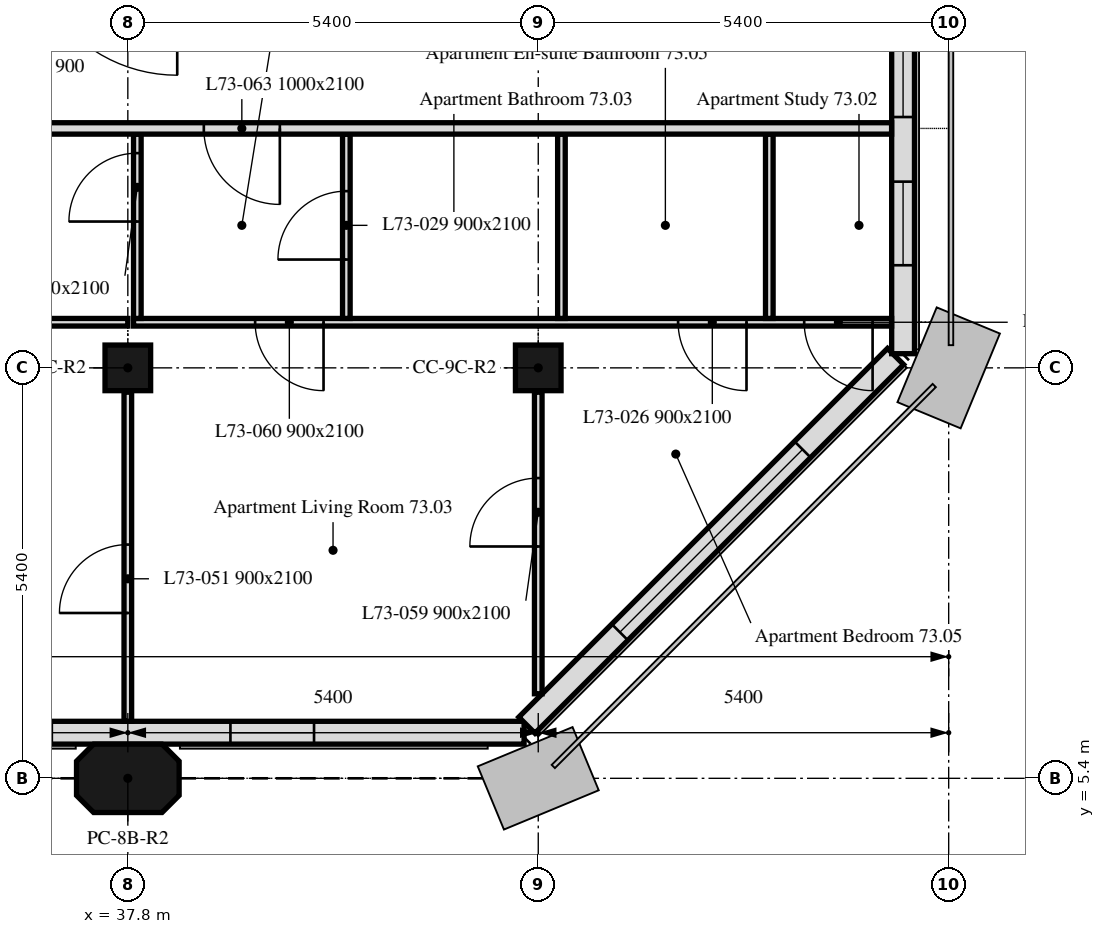
"""IFC4 building model, lengths in metres.
Left out: names, types, materials, properties, quantities, classifications, styles, units other than length and angle.
Written with IfcOpenShell. Run it as: python <this file> out.ifc"""

import sys

from ifc_helpers import new_model, si_unit, direction, frame, frame_2d, origin, origin_2d, place, context, subcontext, project, spatial, polyline, rectangle, outline, extrude, element, fill, save


model = new_model("IFC4")
c1 = context("Model", 3, precision=1e-05, world=origin(), true_north=direction((0.0, 1.0)))
c2 = subcontext(c1, "Body", "Model", "MODEL_VIEW")
j1 = project(units=[si_unit("LENGTHUNIT", "METRE"), si_unit("PLANEANGLEUNIT", "RADIAN")], contexts=[c1])
p1 = place(None, origin())
s1 = spatial("IfcSite", under=j1, at=p1, CompositionType="ELEMENT")
p2 = place(p1, origin())
s2 = spatial("IfcBuilding", under=s1, at=p2, CompositionType="ELEMENT")
p3 = place(p2, frame((0.0, 0.0, 295.0)))
s3 = spatial("IfcBuildingStorey", under=s2, at=p3, CompositionType="ELEMENT", Elevation=295.0)
p4 = place(p3, frame((37.8, 5.4, 0.0), z_axis=(0.0, 0.0, 1.0), x_axis=(1.0, 0.0, 0.0)))
e1 = element("IfcColumn", 1, at=p4, inside=s3, PredefinedType="COLUMN", context=c2, shape_type="SweptSolid", body=[
    extrude(outline(polyline([(-0.45, -0.45), (0.45, -0.45), (0.675, -0.225), (0.675, 0.225), (0.45, 0.45), (-0.45, 0.45), (-0.675, 0.225), (-0.675, -0.225), (-0.45, -0.45)])), origin(), (0.0, 0.0, 1.0), 3.0),
])
for number, where, z_axis, x_axis in (
    (2, (37.8, 10.8, 0.0), (0.0, 0.0, 1.0), (1.0, 0.0, 0.0)),
    (3, (43.2, 10.8, 0.0), (0.0, 0.0, 1.0), (1.0, 0.0, 0.0)),
):
    element("IfcColumn", number, at=place(p3, frame(where, z_axis=z_axis, x_axis=x_axis)), inside=s3, PredefinedType="COLUMN", context=c2, shape_type="SweptSolid", body=[
        extrude(rectangle(XDim=0.6, YDim=0.6, at=origin_2d()), origin(), (0.0, 0.0, 1.0), 3.0),
    ])
p5 = place(p3, frame((10.986, 6.0, 0.0), z_axis=(0.0, 0.0, 1.0), x_axis=(1.0, 0.0, 0.0)))
e4 = element("IfcWall", 4, at=p5, inside=s3, PredefinedType="SOLIDWALL", context=c2, shape_type="SweptSolid", body=[
    extrude(rectangle(XDim=32.027, YDim=0.3, at=frame_2d((16.014, 0.0))), origin(), (0.0, 0.0, 1.0), 3.0),
])
p6 = place(p5, frame((0.814, 0.0, 0.9)))
e5 = element("IfcOpeningElement", 5, at=p6, cuts=e4, PredefinedType="OPENING", context=c2, shape_type="SweptSolid", body=[
    extrude(rectangle(XDim=3.4, YDim=1.7, at=frame_2d((1.7, 0.85))), frame((0.0, 0.16, 0.0), z_axis=(0.0, -1.0, 0.0), x_axis=(1.0, 0.0, 0.0)), (0.0, 0.0, 1.0), 0.32),
])
p7 = place(p5, frame((6.564, 0.0, 0.9)))
e6 = element("IfcOpeningElement", 6, at=p7, cuts=e4, PredefinedType="OPENING", context=c2, shape_type="SweptSolid", body=[
    extrude(rectangle(XDim=1.1, YDim=1.7, at=frame_2d((0.55, 0.85))), frame((0.0, 0.16, 0.0), z_axis=(0.0, -1.0, 0.0), x_axis=(1.0, 0.0, 0.0)), (0.0, 0.0, 1.0), 0.32),
])
p8 = place(p5, frame((11.614, 0.0, 0.9)))
e7 = element("IfcOpeningElement", 7, at=p8, cuts=e4, PredefinedType="OPENING", context=c2, shape_type="SweptSolid", body=[
    extrude(rectangle(XDim=3.4, YDim=1.7, at=frame_2d((1.7, 0.85))), frame((0.0, 0.16, 0.0), z_axis=(0.0, -1.0, 0.0), x_axis=(1.0, 0.0, 0.0)), (0.0, 0.0, 1.0), 0.32),
])
p9 = place(p5, frame((17.364, 0.0, 0.9)))
e8 = element("IfcOpeningElement", 8, at=p9, cuts=e4, PredefinedType="OPENING", context=c2, shape_type="SweptSolid", body=[
    extrude(rectangle(XDim=1.1, YDim=1.7, at=frame_2d((0.55, 0.85))), frame((0.0, 0.16, 0.0), z_axis=(0.0, -1.0, 0.0), x_axis=(1.0, 0.0, 0.0)), (0.0, 0.0, 1.0), 0.32),
])
p10 = place(p5, frame((22.414, 0.0, 0.9)))
e9 = element("IfcOpeningElement", 9, at=p10, cuts=e4, PredefinedType="OPENING", context=c2, shape_type="SweptSolid", body=[
    extrude(rectangle(XDim=3.4, YDim=1.7, at=frame_2d((1.7, 0.85))), frame((0.0, 0.16, 0.0), z_axis=(0.0, -1.0, 0.0), x_axis=(1.0, 0.0, 0.0)), (0.0, 0.0, 1.0), 0.32),
])
p11 = place(p5, frame((28.164, 0.0, 0.9)))
e10 = element("IfcOpeningElement", 10, at=p11, cuts=e4, PredefinedType="OPENING", context=c2, shape_type="SweptSolid", body=[
    extrude(rectangle(XDim=1.1, YDim=1.7, at=frame_2d((0.55, 0.85))), frame((0.0, 0.16, 0.0), z_axis=(0.0, -1.0, 0.0), x_axis=(1.0, 0.0, 0.0)), (0.0, 0.0, 1.0), 0.32),
])
p12 = place(p3, frame((43.051, 6.099, 0.0), z_axis=(0.0, 0.0, 1.0), x_axis=(0.707106781187, 0.707106781187, 0.0)))
e11 = element("IfcWall", 11, at=p12, inside=s3, PredefinedType="SOLIDWALL", context=c2, shape_type="SweptSolid", body=[
    extrude(rectangle(XDim=6.86, YDim=0.3, at=frame_2d((3.43, 0.0))), origin(), (0.0, 0.0, 1.0), 3.0),
])
p13 = place(p12, frame((1.73, 0.0, 0.9)))
e12 = element("IfcOpeningElement", 12, at=p13, cuts=e11, PredefinedType="OPENING", context=c2, shape_type="SweptSolid", body=[
    extrude(rectangle(XDim=3.4, YDim=1.7, at=frame_2d((1.7, 0.85))), frame((0.0, 0.16, 0.0), z_axis=(0.0, -1.0, 0.0), x_axis=(1.0, 0.0, 0.0)), (0.0, 0.0, 1.0), 0.32),
])
p14 = place(p3, frame((48.0, 10.986, 0.0), z_axis=(0.0, 0.0, 1.0), x_axis=(0.0, 1.0, 0.0)))
e13 = element("IfcWall", 13, at=p14, inside=s3, PredefinedType="SOLIDWALL", context=c2, shape_type="SweptSolid", body=[
    extrude(rectangle(XDim=32.027, YDim=0.3, at=frame_2d((16.014, 0.0))), origin(), (0.0, 0.0, 1.0), 3.0),
])
p15 = place(p14, frame((1.164, 0.0, 0.9)))
e14 = element("IfcOpeningElement", 14, at=p15, cuts=e13, PredefinedType="OPENING", context=c2, shape_type="SweptSolid", body=[
    extrude(rectangle(XDim=1.1, YDim=1.7, at=frame_2d((0.55, 0.85))), frame((0.0, 0.16, 0.0), z_axis=(0.0, -1.0, 0.0), x_axis=(1.0, 0.0, 0.0)), (0.0, 0.0, 1.0), 0.32),
])
p16 = place(p14, frame((3.114, 0.0, 0.9)))
e15 = element("IfcOpeningElement", 15, at=p16, cuts=e13, PredefinedType="OPENING", context=c2, shape_type="SweptSolid", body=[
    extrude(rectangle(XDim=1.1, YDim=1.7, at=frame_2d((0.55, 0.85))), frame((0.0, 0.16, 0.0), z_axis=(0.0, -1.0, 0.0), x_axis=(1.0, 0.0, 0.0)), (0.0, 0.0, 1.0), 0.32),
])
p17 = place(p14, frame((6.564, 0.0, 0.9)))
e16 = element("IfcOpeningElement", 16, at=p17, cuts=e13, PredefinedType="OPENING", context=c2, shape_type="SweptSolid", body=[
    extrude(rectangle(XDim=1.1, YDim=1.7, at=frame_2d((0.55, 0.85))), frame((0.0, 0.16, 0.0), z_axis=(0.0, -1.0, 0.0), x_axis=(1.0, 0.0, 0.0)), (0.0, 0.0, 1.0), 0.32),
])
p18 = place(p14, frame((8.164, 0.0, 0.9)))
e17 = element("IfcOpeningElement", 17, at=p18, cuts=e13, PredefinedType="OPENING", context=c2, shape_type="SweptSolid", body=[
    extrude(rectangle(XDim=1.1, YDim=1.7, at=frame_2d((0.55, 0.85))), frame((0.0, 0.16, 0.0), z_axis=(0.0, -1.0, 0.0), x_axis=(1.0, 0.0, 0.0)), (0.0, 0.0, 1.0), 0.32),
])
p19 = place(p14, frame((11.614, 0.0, 0.9)))
e18 = element("IfcOpeningElement", 18, at=p19, cuts=e13, PredefinedType="OPENING", context=c2, shape_type="SweptSolid", body=[
    extrude(rectangle(XDim=3.4, YDim=1.7, at=frame_2d((1.7, 0.85))), frame((0.0, 0.16, 0.0), z_axis=(0.0, -1.0, 0.0), x_axis=(1.0, 0.0, 0.0)), (0.0, 0.0, 1.0), 0.32),
])
p20 = place(p14, frame((17.364, 0.0, 0.9)))
e19 = element("IfcOpeningElement", 19, at=p20, cuts=e13, PredefinedType="OPENING", context=c2, shape_type="SweptSolid", body=[
    extrude(rectangle(XDim=1.1, YDim=1.7, at=frame_2d((0.55, 0.85))), frame((0.0, 0.16, 0.0), z_axis=(0.0, -1.0, 0.0), x_axis=(1.0, 0.0, 0.0)), (0.0, 0.0, 1.0), 0.32),
])
p21 = place(p14, frame((18.964, 0.0, 0.9)))
e20 = element("IfcOpeningElement", 20, at=p21, cuts=e13, PredefinedType="OPENING", context=c2, shape_type="SweptSolid", body=[
    extrude(rectangle(XDim=1.1, YDim=1.7, at=frame_2d((0.55, 0.85))), frame((0.0, 0.16, 0.0), z_axis=(0.0, -1.0, 0.0), x_axis=(1.0, 0.0, 0.0)), (0.0, 0.0, 1.0), 0.32),
])
p22 = place(p14, frame((22.839, 0.0, 0.9)))
e21 = element("IfcOpeningElement", 21, at=p22, cuts=e13, PredefinedType="OPENING", context=c2, shape_type="SweptSolid", body=[
    extrude(rectangle(XDim=0.65, YDim=1.7, at=frame_2d((0.325, 0.85))), frame((0.0, 0.16, 0.0), z_axis=(0.0, -1.0, 0.0), x_axis=(1.0, 0.0, 0.0)), (0.0, 0.0, 1.0), 0.32),
])
p23 = place(p14, frame((24.364, 0.0, 0.9)))
e22 = element("IfcOpeningElement", 22, at=p23, cuts=e13, PredefinedType="OPENING", context=c2, shape_type="SweptSolid", body=[
    extrude(rectangle(XDim=1.1, YDim=1.7, at=frame_2d((0.55, 0.85))), frame((0.0, 0.16, 0.0), z_axis=(0.0, -1.0, 0.0), x_axis=(1.0, 0.0, 0.0)), (0.0, 0.0, 1.0), 0.32),
])
p24 = place(p14, frame((28.164, 0.0, 0.9)))
e23 = element("IfcOpeningElement", 23, at=p24, cuts=e13, PredefinedType="OPENING", context=c2, shape_type="SweptSolid", body=[
    extrude(rectangle(XDim=1.1, YDim=1.7, at=frame_2d((0.55, 0.85))), frame((0.0, 0.16, 0.0), z_axis=(0.0, -1.0, 0.0), x_axis=(1.0, 0.0, 0.0)), (0.0, 0.0, 1.0), 0.32),
])
p25 = place(p14, frame((29.589, 0.0, 0.9)))
e24 = element("IfcOpeningElement", 24, at=p25, cuts=e13, PredefinedType="OPENING", context=c2, shape_type="SweptSolid", body=[
    extrude(rectangle(XDim=0.65, YDim=1.7, at=frame_2d((0.325, 0.85))), frame((0.0, 0.16, 0.0), z_axis=(0.0, -1.0, 0.0), x_axis=(1.0, 0.0, 0.0)), (0.0, 0.0, 1.0), 0.32),
])
p26 = place(p3, frame((37.8, 11.4, 0.0), z_axis=(0.0, 0.0, 1.0), x_axis=(-1.0, 0.0, 0.0)))
e25 = element("IfcWall", 25, at=p26, inside=s3, PredefinedType="PARTITIONING", context=c2, shape_type="SweptSolid", body=[
    extrude(rectangle(XDim=21.6, YDim=0.1, at=frame_2d((10.8, 0.0))), origin(), (0.0, 0.0, 1.0), 3.0),
])
p27 = place(p26, frame((18.87, 0.0, 0.0)))
e26 = element("IfcOpeningElement", 26, at=p27, cuts=e25, PredefinedType="OPENING", context=c2, shape_type="SweptSolid", body=[
    extrude(rectangle(XDim=0.9, YDim=2.1, at=frame_2d((0.45, 1.05))), frame((0.0, 0.05, 0.0), z_axis=(0.0, -1.0, 0.0), x_axis=(1.0, 0.0, 0.0)), (0.0, 0.0, 1.0), 0.1),
])
p28 = place(p26, frame((17.5, 0.0, 0.0)))
e27 = element("IfcOpeningElement", 27, at=p28, cuts=e25, PredefinedType="OPENING", context=c2, shape_type="SweptSolid", body=[
    extrude(rectangle(XDim=0.9, YDim=2.1, at=frame_2d((0.45, 1.05))), frame((0.0, 0.05, 0.0), z_axis=(0.0, -1.0, 0.0), x_axis=(1.0, 0.0, 0.0)), (0.0, 0.0, 1.0), 0.1),
])
p29 = place(p26, frame((6.917, 0.0, 0.0)))
e28 = element("IfcOpeningElement", 28, at=p29, cuts=e25, PredefinedType="OPENING", context=c2, shape_type="SweptSolid", body=[
    extrude(rectangle(XDim=0.9, YDim=2.1, at=frame_2d((0.45, 1.05))), frame((0.0, 0.05, 0.0), z_axis=(0.0, -1.0, 0.0), x_axis=(1.0, 0.0, 0.0)), (0.0, 0.0, 1.0), 0.1),
])
p30 = place(p26, frame((3.15, 0.0, 0.0)))
e29 = element("IfcOpeningElement", 29, at=p30, cuts=e25, PredefinedType="OPENING", context=c2, shape_type="SweptSolid", body=[
    extrude(rectangle(XDim=0.9, YDim=2.1, at=frame_2d((0.45, 1.05))), frame((0.0, 0.05, 0.0), z_axis=(0.0, -1.0, 0.0), x_axis=(1.0, 0.0, 0.0)), (0.0, 0.0, 1.0), 0.1),
])
p31 = place(p26, frame((14.158, 0.0, 0.0)))
e30 = element("IfcOpeningElement", 30, at=p31, cuts=e25, PredefinedType="OPENING", context=c2, shape_type="SweptSolid", body=[
    extrude(rectangle(XDim=0.9, YDim=2.1, at=frame_2d((0.45, 1.05))), frame((0.0, 0.05, 0.0), z_axis=(0.0, -1.0, 0.0), x_axis=(1.0, 0.0, 0.0)), (0.0, 0.0, 1.0), 0.1),
])
p32 = place(p26, frame((12.788, 0.0, 0.0)))
e31 = element("IfcOpeningElement", 31, at=p32, cuts=e25, PredefinedType="OPENING", context=c2, shape_type="SweptSolid", body=[
    extrude(rectangle(XDim=0.9, YDim=2.1, at=frame_2d((0.45, 1.05))), frame((0.0, 0.05, 0.0), z_axis=(0.0, -1.0, 0.0), x_axis=(1.0, 0.0, 0.0)), (0.0, 0.0, 1.0), 0.1),
])
p33 = place(p3, frame((37.8, 6.151, 0.0), z_axis=(0.0, 0.0, 1.0), x_axis=(0.0, 1.0, 0.0)))
e32 = element("IfcWall", 32, at=p33, inside=s3, PredefinedType="PARTITIONING", context=c2, shape_type="SweptSolid", body=[
    extrude(rectangle(XDim=4.329, YDim=0.1, at=frame_2d((2.165, 0.0))), origin(), (0.0, 0.0, 1.0), 3.0),
])
p34 = place(p33, frame((1.424, 0.0, 0.0)))
e33 = element("IfcOpeningElement", 33, at=p34, cuts=e32, PredefinedType="OPENING", context=c2, shape_type="SweptSolid", body=[
    extrude(rectangle(XDim=0.9, YDim=2.1, at=frame_2d((0.45, 1.05))), frame((0.0, 0.05, 0.0), z_axis=(0.0, -1.0, 0.0), x_axis=(1.0, 0.0, 0.0)), (0.0, 0.0, 1.0), 0.1),
])
p35 = place(p3, frame((43.2, 6.512, 0.0), z_axis=(0.0, 0.0, 1.0), x_axis=(0.0, 1.0, 0.0)))
e34 = element("IfcWall", 34, at=p35, inside=s3, PredefinedType="PARTITIONING", context=c2, shape_type="SweptSolid", body=[
    extrude(rectangle(XDim=3.968, YDim=0.1, at=frame_2d((1.984, 0.0))), origin(), (0.0, 0.0, 1.0), 3.0),
])
p36 = place(p35, frame((1.938, 0.0, 0.0)))
e35 = element("IfcOpeningElement", 35, at=p36, cuts=e34, PredefinedType="OPENING", context=c2, shape_type="SweptSolid", body=[
    extrude(rectangle(XDim=0.9, YDim=2.1, at=frame_2d((0.45, 1.05))), frame((0.0, 0.05, 0.0), z_axis=(0.0, -1.0, 0.0), x_axis=(1.0, 0.0, 0.0)), (0.0, 0.0, 1.0), 0.1),
])
p37 = place(p3, frame((47.849, 11.4, 0.0), z_axis=(0.0, 0.0, 1.0), x_axis=(-1.0, 0.0, 0.0)))
e36 = element("IfcWall", 36, at=p37, inside=s3, PredefinedType="PARTITIONING", context=c2, shape_type="SweptSolid", body=[
    extrude(rectangle(XDim=9.974, YDim=0.1, at=frame_2d((4.987, 0.0))), origin(), (0.0, 0.0, 1.0), 3.0),
])
p38 = place(p37, frame((1.909, 0.0, 0.0)))
e37 = element("IfcOpeningElement", 37, at=p38, cuts=e36, PredefinedType="OPENING", context=c2, shape_type="SweptSolid", body=[
    extrude(rectangle(XDim=0.9, YDim=2.1, at=frame_2d((0.45, 1.05))), frame((0.0, 0.05, 0.0), z_axis=(0.0, -1.0, 0.0), x_axis=(1.0, 0.0, 0.0)), (0.0, 0.0, 1.0), 0.1),
])
p39 = place(p37, frame((0.25, 0.0, 0.0)))
e38 = element("IfcOpeningElement", 38, at=p39, cuts=e36, PredefinedType="OPENING", context=c2, shape_type="SweptSolid", body=[
    extrude(rectangle(XDim=0.9, YDim=2.1, at=frame_2d((0.45, 1.05))), frame((0.0, 0.05, 0.0), z_axis=(0.0, -1.0, 0.0), x_axis=(1.0, 0.0, 0.0)), (0.0, 0.0, 1.0), 0.1),
])
p40 = place(p37, frame((7.474, 0.0, 0.0)))
e39 = element("IfcOpeningElement", 39, at=p40, cuts=e36, PredefinedType="OPENING", context=c2, shape_type="SweptSolid", body=[
    extrude(rectangle(XDim=0.9, YDim=2.1, at=frame_2d((0.45, 1.05))), frame((0.0, 0.05, 0.0), z_axis=(0.0, -1.0, 0.0), x_axis=(1.0, 0.0, 0.0)), (0.0, 0.0, 1.0), 0.1),
])
p41 = place(p3, frame((37.925, 11.45, 0.0), z_axis=(0.0, 0.0, 1.0), x_axis=(0.0, 1.0, 0.0)))
e40 = element("IfcWall", 40, at=p41, inside=s3, PredefinedType="PARTITIONING", context=c2, shape_type="SweptSolid", body=[
    extrude(rectangle(XDim=2.425, YDim=0.1, at=frame_2d((1.212, 0.0))), origin(), (0.0, 0.0, 1.0), 3.0),
])
p42 = place(p41, frame((1.275, 0.0, 0.0)))
e41 = element("IfcOpeningElement", 41, at=p42, cuts=e40, PredefinedType="OPENING", context=c2, shape_type="SweptSolid", body=[
    extrude(rectangle(XDim=0.9, YDim=2.1, at=frame_2d((0.45, 1.05))), frame((0.0, 0.05, 0.0), z_axis=(0.0, -1.0, 0.0), x_axis=(1.0, 0.0, 0.0)), (0.0, 0.0, 1.0), 0.1),
])
p43 = place(p3, frame((40.675, 11.45, 0.0), z_axis=(0.0, 0.0, 1.0), x_axis=(0.0, 1.0, 0.0)))
e42 = element("IfcWall", 42, at=p43, inside=s3, PredefinedType="PARTITIONING", context=c2, shape_type="SweptSolid", body=[
    extrude(rectangle(XDim=2.425, YDim=0.1, at=frame_2d((1.212, 0.0))), origin(), (0.0, 0.0, 1.0), 3.0),
])
p44 = place(p43, frame((0.775, 0.0, 0.0)))
e43 = element("IfcOpeningElement", 43, at=p44, cuts=e42, PredefinedType="OPENING", context=c2, shape_type="SweptSolid", body=[
    extrude(rectangle(XDim=0.9, YDim=2.1, at=frame_2d((0.45, 1.05))), frame((0.0, 0.05, 0.0), z_axis=(0.0, -1.0, 0.0), x_axis=(1.0, 0.0, 0.0)), (0.0, 0.0, 1.0), 0.1),
])
for number, where, z_axis, x_axis in (
    (44, (43.505, 11.45, 0.0), (0.0, 0.0, 1.0), (0.0, 1.0, 0.0)),
    (45, (46.24, 11.45, 0.0), (0.0, 0.0, 1.0), (0.0, 1.0, 0.0)),
):
    element("IfcWall", number, at=place(p3, frame(where, z_axis=z_axis, x_axis=x_axis)), inside=s3, PredefinedType="PARTITIONING", context=c2, shape_type="SweptSolid", body=[
        extrude(rectangle(XDim=2.425, YDim=0.1, at=frame_2d((1.212, 0.0))), origin(), (0.0, 0.0, 1.0), 3.0),
    ])
p45 = place(p3, frame((47.849, 13.95, 0.0), z_axis=(0.0, 0.0, 1.0), x_axis=(-1.0, 0.0, 0.0)))
e46 = element("IfcWall", 46, at=p45, inside=s3, PredefinedType="PARTITIONING", context=c2, shape_type="SweptSolid", body=[
    extrude(rectangle(XDim=41.698, YDim=0.15, at=frame_2d((20.849, 0.0))), origin(), (0.0, 0.0, 1.0), 3.0),
])
p46 = place(p45, frame((35.609, 0.0, 0.0)))
e47 = element("IfcOpeningElement", 47, at=p46, cuts=e46, PredefinedType="OPENING", context=c2, shape_type="SweptSolid", body=[
    extrude(rectangle(XDim=1.0, YDim=2.1, at=frame_2d((0.5, 1.05))), frame((0.0, 0.075, 0.0), z_axis=(0.0, -1.0, 0.0), x_axis=(1.0, 0.0, 0.0)), (0.0, 0.0, 1.0), 0.15),
])
p47 = place(p45, frame((22.354, 0.0, 0.0)))
e48 = element("IfcOpeningElement", 48, at=p47, cuts=e46, PredefinedType="OPENING", context=c2, shape_type="SweptSolid", body=[
    extrude(rectangle(XDim=1.0, YDim=2.1, at=frame_2d((0.5, 1.05))), frame((0.0, 0.075, 0.0), z_axis=(0.0, -1.0, 0.0), x_axis=(1.0, 0.0, 0.0)), (0.0, 0.0, 1.0), 0.15),
])
p48 = place(p45, frame((8.049, 0.0, 0.0)))
e49 = element("IfcOpeningElement", 49, at=p48, cuts=e46, PredefinedType="OPENING", context=c2, shape_type="SweptSolid", body=[
    extrude(rectangle(XDim=1.0, YDim=2.1, at=frame_2d((0.5, 1.05))), frame((0.0, 0.075, 0.0), z_axis=(0.0, -1.0, 0.0), x_axis=(1.0, 0.0, 0.0)), (0.0, 0.0, 1.0), 0.15),
])
p49 = place(p11, origin())
e50 = element("IfcWindow", 50, at=p49, inside=s3, PartitioningType="SINGLE_PANEL", PredefinedType="WINDOW", context=c2, shape_type="SweptSolid", body=[
    extrude(rectangle(XDim=1.1, YDim=1.7, at=frame_2d((0.55, 0.85))), frame((0.0, 0.03, 0.0), z_axis=(0.0, -1.0, 0.0), x_axis=(1.0, 0.0, 0.0)), (0.0, 0.0, 1.0), 0.06),
])
fill(e10, e50)
p50 = place(p13, origin())
e51 = element("IfcWindow", 51, at=p50, inside=s3, PartitioningType="SINGLE_PANEL", PredefinedType="WINDOW", context=c2, shape_type="SweptSolid", body=[
    extrude(rectangle(XDim=3.4, YDim=1.7, at=frame_2d((1.7, 0.85))), frame((0.0, 0.03, 0.0), z_axis=(0.0, -1.0, 0.0), x_axis=(1.0, 0.0, 0.0)), (0.0, 0.0, 1.0), 0.06),
])
fill(e12, e51)
p51 = place(p15, origin())
e52 = element("IfcWindow", 52, at=p51, inside=s3, PartitioningType="SINGLE_PANEL", PredefinedType="WINDOW", context=c2, shape_type="SweptSolid", body=[
    extrude(rectangle(XDim=1.1, YDim=1.7, at=frame_2d((0.55, 0.85))), frame((0.0, 0.03, 0.0), z_axis=(0.0, -1.0, 0.0), x_axis=(1.0, 0.0, 0.0)), (0.0, 0.0, 1.0), 0.06),
])
fill(e14, e52)
p52 = place(p16, origin())
e53 = element("IfcWindow", 53, at=p52, inside=s3, PartitioningType="SINGLE_PANEL", PredefinedType="WINDOW", context=c2, shape_type="SweptSolid", body=[
    extrude(rectangle(XDim=1.1, YDim=1.7, at=frame_2d((0.55, 0.85))), frame((0.0, 0.03, 0.0), z_axis=(0.0, -1.0, 0.0), x_axis=(1.0, 0.0, 0.0)), (0.0, 0.0, 1.0), 0.06),
])
fill(e15, e53)
p53 = place(p38, origin())
e54 = element("IfcDoor", 54, at=p53, inside=s3, OperationType="SINGLE_SWING_LEFT", PredefinedType="DOOR", context=c2, shape_type="SweptSolid", body=[
    extrude(rectangle(XDim=0.9, YDim=2.1, at=frame_2d((0.45, 1.05))), frame((0.0, 0.025, 0.0), z_axis=(0.0, -1.0, 0.0), x_axis=(1.0, 0.0, 0.0)), (0.0, 0.0, 1.0), 0.05),
])
fill(e37, e54)
p54 = place(p39, origin())
e55 = element("IfcDoor", 55, at=p54, inside=s3, OperationType="SINGLE_SWING_RIGHT", PredefinedType="DOOR", context=c2, shape_type="SweptSolid", body=[
    extrude(rectangle(XDim=0.9, YDim=2.1, at=frame_2d((0.45, 1.05))), frame((0.0, 0.025, 0.0), z_axis=(0.0, -1.0, 0.0), x_axis=(1.0, 0.0, 0.0)), (0.0, 0.0, 1.0), 0.05),
])
fill(e38, e55)
p55 = place(p42, origin())
e56 = element("IfcDoor", 56, at=p55, inside=s3, OperationType="SINGLE_SWING_RIGHT", PredefinedType="DOOR", context=c2, shape_type="SweptSolid", body=[
    extrude(rectangle(XDim=0.9, YDim=2.1, at=frame_2d((0.45, 1.05))), frame((0.0, 0.025, 0.0), z_axis=(0.0, -1.0, 0.0), x_axis=(1.0, 0.0, 0.0)), (0.0, 0.0, 1.0), 0.05),
])
fill(e41, e56)
p56 = place(p44, origin())
e57 = element("IfcDoor", 57, at=p56, inside=s3, OperationType="SINGLE_SWING_LEFT", PredefinedType="DOOR", context=c2, shape_type="SweptSolid", body=[
    extrude(rectangle(XDim=0.9, YDim=2.1, at=frame_2d((0.45, 1.05))), frame((0.0, 0.025, 0.0), z_axis=(0.0, -1.0, 0.0), x_axis=(1.0, 0.0, 0.0)), (0.0, 0.0, 1.0), 0.05),
])
fill(e43, e57)
p57 = place(p34, origin())
e58 = element("IfcDoor", 58, at=p57, inside=s3, OperationType="SINGLE_SWING_LEFT", PredefinedType="DOOR", context=c2, shape_type="SweptSolid", body=[
    extrude(rectangle(XDim=0.9, YDim=2.1, at=frame_2d((0.45, 1.05))), frame((0.0, 0.025, 0.0), z_axis=(0.0, -1.0, 0.0), x_axis=(1.0, 0.0, 0.0)), (0.0, 0.0, 1.0), 0.05),
])
fill(e33, e58)
p58 = place(p36, origin())
e59 = element("IfcDoor", 59, at=p58, inside=s3, OperationType="SINGLE_SWING_RIGHT", PredefinedType="DOOR", context=c2, shape_type="SweptSolid", body=[
    extrude(rectangle(XDim=0.9, YDim=2.1, at=frame_2d((0.45, 1.05))), frame((0.0, 0.025, 0.0), z_axis=(0.0, -1.0, 0.0), x_axis=(1.0, 0.0, 0.0)), (0.0, 0.0, 1.0), 0.05),
])
fill(e35, e59)
p59 = place(p40, origin())
e60 = element("IfcDoor", 60, at=p59, inside=s3, OperationType="SINGLE_SWING_RIGHT", PredefinedType="DOOR", context=c2, shape_type="SweptSolid", body=[
    extrude(rectangle(XDim=0.9, YDim=2.1, at=frame_2d((0.45, 1.05))), frame((0.0, 0.025, 0.0), z_axis=(0.0, -1.0, 0.0), x_axis=(1.0, 0.0, 0.0)), (0.0, 0.0, 1.0), 0.05),
])
fill(e39, e60)
p60 = place(p48, origin())
e61 = element("IfcDoor", 61, at=p60, inside=s3, OperationType="SINGLE_SWING_LEFT", PredefinedType="DOOR", context=c2, shape_type="SweptSolid", body=[
    extrude(rectangle(XDim=1.0, YDim=2.1, at=frame_2d((0.5, 1.05))), frame((0.0, 0.025, 0.0), z_axis=(0.0, -1.0, 0.0), x_axis=(1.0, 0.0, 0.0)), (0.0, 0.0, 1.0), 0.05),
])
fill(e49, e61)
save(model, sys.argv[1])
